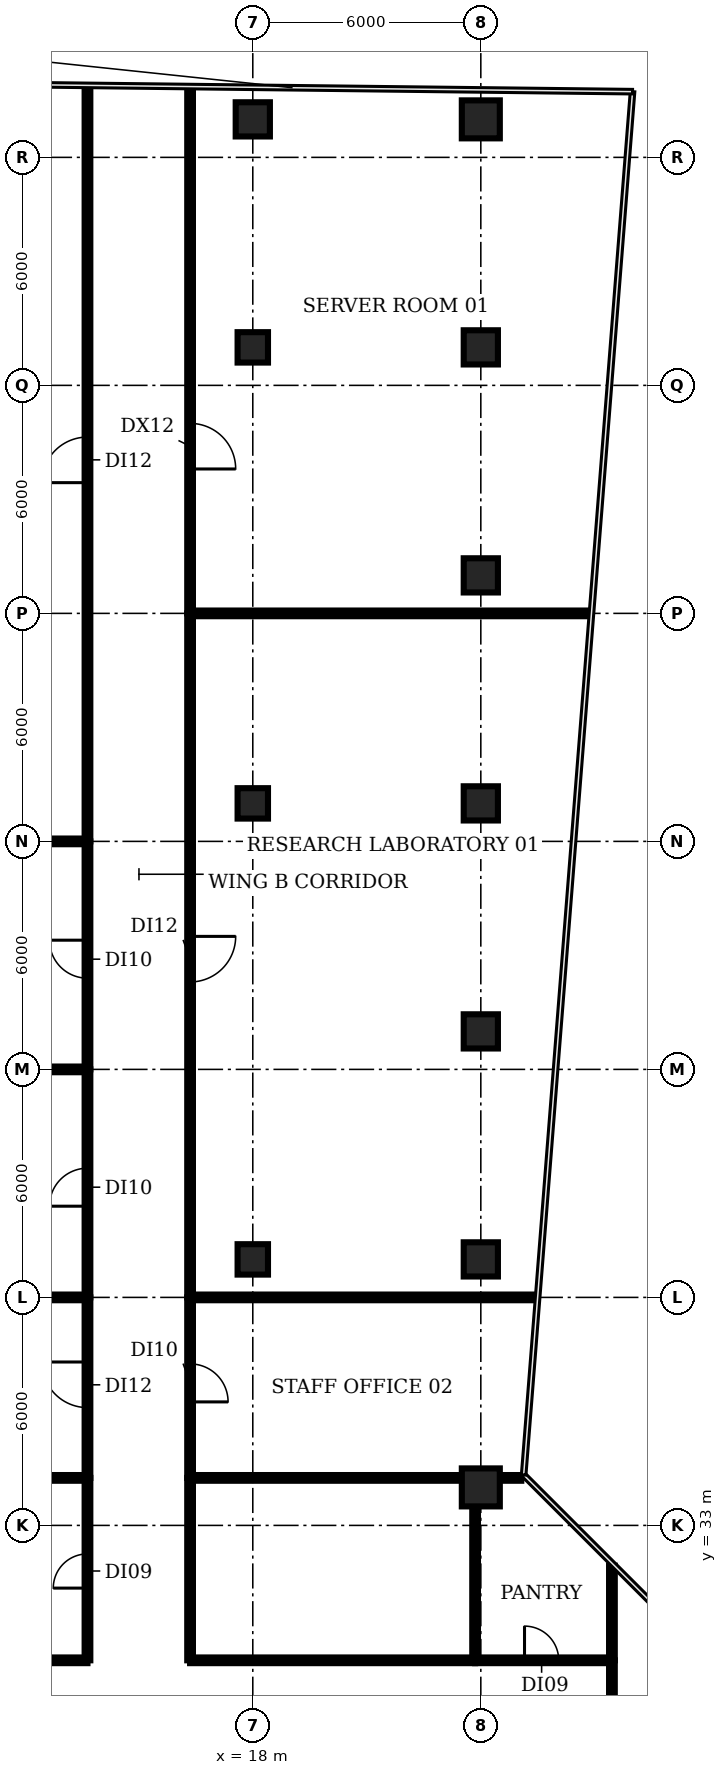
"""IFC4 building model, lengths in metres.
Left out: names, types, materials, properties, quantities, classifications, styles, units other than length and angle.
Written with IfcOpenShell. Run it as: python <this file> out.ifc"""

import sys

from ifc_helpers import new_model, si_unit, direction, frame, frame_2d, origin, origin_2d, place, context, subcontext, project, spatial, rectangle, circle, extrude, element, fill, save


model = new_model("IFC4")
c1 = context("Model", 3, precision=1e-05, world=origin(), true_north=direction((0.0, 1.0)))
c2 = subcontext(c1, "Body", "Model", "MODEL_VIEW")
j1 = project(units=[si_unit("LENGTHUNIT", "METRE"), si_unit("PLANEANGLEUNIT", "RADIAN")], contexts=[c1])
p1 = place(None, origin())
s1 = spatial("IfcSite", under=j1, at=p1, CompositionType="ELEMENT")
p2 = place(p1, origin())
s2 = spatial("IfcBuilding", under=s1, at=p2, CompositionType="ELEMENT")
p3 = place(p2, frame((0.0, 0.0, 129.8)))
s3 = spatial("IfcBuildingStorey", under=s2, at=p3, CompositionType="ELEMENT", Elevation=129.8)
for number, where, z_axis, x_axis in (
    (1, (18.0, 40.0, 0.0), (0.0, 0.0, 1.0), (1.0, 0.0, 0.0)),
    (2, (18.0, 52.0, 0.0), (0.0, 0.0, 1.0), (1.0, 0.0, 0.0)),
    (3, (18.0, 64.0, 0.0), (0.0, 0.0, 1.0), (1.0, 0.0, 0.0)),
):
    element("IfcColumn", number, at=place(p3, frame(where, z_axis=z_axis, x_axis=x_axis)), inside=s3, PredefinedType="COLUMN", context=c2, shape_type="SweptSolid", body=[
        extrude(rectangle(XDim=0.8, YDim=0.8, at=origin_2d()), origin(), (0.0, 0.0, 1.0), 3.85),
    ])
p4 = place(p3, frame((18.0, 70.0, 0.0), z_axis=(0.0, 0.0, 1.0), x_axis=(1.0, 0.0, 0.0)))
e4 = element("IfcColumn", 4, at=p4, inside=s3, PredefinedType="COLUMN", context=c2, shape_type="SweptSolid", body=[
    extrude(rectangle(XDim=0.9, YDim=0.9, at=origin_2d()), origin(), (0.0, 0.0, 1.0), 3.85),
])
p5 = place(p3, frame((24.0, 34.0, 0.0), z_axis=(0.0, 0.0, 1.0), x_axis=(1.0, 0.0, 0.0)))
e5 = element("IfcColumn", 5, at=p5, inside=s3, PredefinedType="COLUMN", context=c2, shape_type="SweptSolid", body=[
    extrude(circle(Radius=0.5, at=origin_2d()), origin(), (0.0, 0.0, 1.0), 3.85),
])
for number, where, z_axis, x_axis in (
    (6, (24.0, 40.0, 0.0), (0.0, 0.0, 1.0), (1.0, 0.0, 0.0)),
    (7, (24.0, 46.0, 0.0), (0.0, 0.0, 1.0), (1.0, 0.0, 0.0)),
    (8, (24.0, 52.0, 0.0), (0.0, 0.0, 1.0), (1.0, 0.0, 0.0)),
    (9, (24.0, 58.0, 0.0), (0.0, 0.0, 1.0), (1.0, 0.0, 0.0)),
    (10, (24.0, 64.0, 0.0), (0.0, 0.0, 1.0), (1.0, 0.0, 0.0)),
):
    element("IfcColumn", number, at=place(p3, frame(where, z_axis=z_axis, x_axis=x_axis)), inside=s3, PredefinedType="COLUMN", context=c2, shape_type="SweptSolid", body=[
        extrude(rectangle(XDim=0.9, YDim=0.9, at=origin_2d()), origin(), (0.0, 0.0, 1.0), 3.85),
    ])
p6 = place(p3, frame((24.0, 70.0, 0.0), z_axis=(0.0, 0.0, 1.0), x_axis=(1.0, 0.0, 0.0)))
e11 = element("IfcColumn", 11, at=p6, inside=s3, PredefinedType="COLUMN", context=c2, shape_type="SweptSolid", body=[
    extrude(circle(Radius=0.5, at=origin_2d()), origin(), (0.0, 0.0, 1.0), 3.85),
])
p7 = place(p3, frame((-0.965, 34.25, 0.0), z_axis=(0.0, 0.0, 1.0), x_axis=(1.0, 0.0, 0.0)))
e12 = element("IfcWall", 12, at=p7, inside=s3, PredefinedType="PARTITIONING", context=c2, shape_type="SweptSolid", body=[
    extrude(rectangle(XDim=14.615, YDim=0.15, at=frame_2d((7.308, 0.0))), origin(), (0.0, 0.0, 1.0), 2.83),
])
for number, where, z_axis, x_axis in (
    (13, (-0.98, 39.0, 0.0), (0.0, 0.0, 1.0), (1.0, 0.0, 0.0)),
    (14, (-0.98, 45.0, 0.0), (0.0, 0.0, 1.0), (1.0, 0.0, 0.0)),
    (15, (-0.98, 51.0, 0.0), (0.0, 0.0, 1.0), (1.0, 0.0, 0.0)),
):
    element("IfcWall", number, at=place(p3, frame(where, z_axis=z_axis, x_axis=x_axis)), inside=s3, PredefinedType="PARTITIONING", context=c2, shape_type="SweptSolid", body=[
        extrude(rectangle(XDim=14.63, YDim=0.15, at=frame_2d((7.315, 0.0))), origin(), (0.0, 0.0, 1.0), 2.83),
    ])
p8 = place(p3, frame((8.8, 29.45, 0.0), z_axis=(0.0, 0.0, 1.0), x_axis=(1.0, 0.0, 0.0)))
e16 = element("IfcWall", 16, at=p8, inside=s3, PredefinedType="PARTITIONING", context=c2, shape_type="SweptSolid", body=[
    extrude(rectangle(XDim=4.85, YDim=0.15, at=frame_2d((2.425, 0.0))), origin(), (0.0, 0.0, 1.0), 2.83),
])
p9 = place(p3, frame((13.65, 29.45, 0.0), z_axis=(0.0, 0.0, 1.0), x_axis=(0.0, 1.0, 0.0)))
e17 = element("IfcWall", 17, at=p9, inside=s3, PredefinedType="PARTITIONING", context=c2, shape_type="SweptSolid", body=[
    extrude(rectangle(XDim=4.8, YDim=0.15, at=frame_2d((2.4, 0.0))), origin(), (0.0, 0.0, 1.0), 2.83),
])
p10 = place(p9, frame((1.9, 0.0, 0.0)))
e18 = element("IfcOpeningElement", 18, at=p10, cuts=e17, PredefinedType="OPENING", context=c2, shape_type="SweptSolid", body=[
    extrude(rectangle(XDim=0.9, YDim=2.1, at=frame_2d((0.45, 1.05))), frame((0.0, 0.085, 0.0), z_axis=(0.0, -1.0, 0.0), x_axis=(1.0, 0.0, 0.0)), (0.0, 0.0, 1.0), 0.17),
])
p11 = place(p3, frame((13.65, 34.25, 0.0), z_axis=(0.0, 0.0, 1.0), x_axis=(0.0, 1.0, 0.0)))
e19 = element("IfcWall", 19, at=p11, inside=s3, PredefinedType="PARTITIONING", context=c2, shape_type="SweptSolid", body=[
    extrude(rectangle(XDim=4.75, YDim=0.15, at=frame_2d((2.375, 0.0))), origin(), (0.0, 0.0, 1.0), 2.83),
])
p12 = place(p11, frame((1.85, 0.0, 0.0)))
e20 = element("IfcOpeningElement", 20, at=p12, cuts=e19, PredefinedType="OPENING", context=c2, shape_type="SweptSolid", body=[
    extrude(rectangle(XDim=1.2, YDim=2.1, at=frame_2d((0.6, 1.05))), frame((0.0, 0.085, 0.0), z_axis=(0.0, -1.0, 0.0), x_axis=(1.0, 0.0, 0.0)), (0.0, 0.0, 1.0), 0.17),
])
p13 = place(p3, frame((13.65, 39.0, 0.0), z_axis=(0.0, 0.0, 1.0), x_axis=(0.0, 1.0, 0.0)))
e21 = element("IfcWall", 21, at=p13, inside=s3, PredefinedType="PARTITIONING", context=c2, shape_type="SweptSolid", body=[
    extrude(rectangle(XDim=6.0, YDim=0.15, at=frame_2d((3.0, 0.0))), origin(), (0.0, 0.0, 1.0), 2.83),
])
p14 = place(p13, frame((2.4, 0.0, 0.0)))
e22 = element("IfcOpeningElement", 22, at=p14, cuts=e21, PredefinedType="OPENING", context=c2, shape_type="SweptSolid", body=[
    extrude(rectangle(XDim=1.0, YDim=2.1, at=frame_2d((0.5, 1.05))), frame((0.0, 0.085, 0.0), z_axis=(0.0, -1.0, 0.0), x_axis=(1.0, 0.0, 0.0)), (0.0, 0.0, 1.0), 0.17),
])
p15 = place(p3, frame((13.65, 45.0, 0.0), z_axis=(0.0, 0.0, 1.0), x_axis=(0.0, 1.0, 0.0)))
e23 = element("IfcWall", 23, at=p15, inside=s3, PredefinedType="PARTITIONING", context=c2, shape_type="SweptSolid", body=[
    extrude(rectangle(XDim=6.0, YDim=0.15, at=frame_2d((3.0, 0.0))), origin(), (0.0, 0.0, 1.0), 2.83),
])
p16 = place(p15, frame((2.4, 0.0, 0.0)))
e24 = element("IfcOpeningElement", 24, at=p16, cuts=e23, PredefinedType="OPENING", context=c2, shape_type="SweptSolid", body=[
    extrude(rectangle(XDim=1.0, YDim=2.1, at=frame_2d((0.5, 1.05))), frame((0.0, 0.085, 0.0), z_axis=(0.0, -1.0, 0.0), x_axis=(1.0, 0.0, 0.0)), (0.0, 0.0, 1.0), 0.17),
])
p17 = place(p3, frame((13.65, 51.0, 0.0), z_axis=(0.0, 0.0, 1.0), x_axis=(0.0, 1.0, 0.0)))
e25 = element("IfcWall", 25, at=p17, inside=s3, PredefinedType="PARTITIONING", context=c2, shape_type="SweptSolid", body=[
    extrude(rectangle(XDim=19.84, YDim=0.15, at=frame_2d((9.92, 0.0))), origin(), (0.0, 0.0, 1.0), 2.83),
])
p18 = place(p17, frame((9.44, 0.0, 0.0)))
e26 = element("IfcOpeningElement", 26, at=p18, cuts=e25, PredefinedType="OPENING", context=c2, shape_type="SweptSolid", body=[
    extrude(rectangle(XDim=1.2, YDim=2.1, at=frame_2d((0.6, 1.05))), frame((0.0, 0.085, 0.0), z_axis=(0.0, -1.0, 0.0), x_axis=(1.0, 0.0, 0.0)), (0.0, 0.0, 1.0), 0.17),
])
p19 = place(p3, frame((16.35, 29.45, 0.0), z_axis=(0.0, 0.0, 1.0), x_axis=(0.0, 1.0, 0.0)))
e27 = element("IfcWall", 27, at=p19, inside=s3, PredefinedType="PARTITIONING", context=c2, shape_type="SweptSolid", body=[
    extrude(rectangle(XDim=4.8, YDim=0.15, at=frame_2d((2.4, 0.0))), origin(), (0.0, 0.0, 1.0), 2.83),
])
p20 = place(p3, frame((16.35, 29.45, 0.0), z_axis=(0.0, 0.0, 1.0), x_axis=(1.0, 0.0, 0.0)))
e28 = element("IfcWall", 28, at=p20, inside=s3, PredefinedType="PARTITIONING", context=c2, shape_type="SweptSolid", body=[
    extrude(rectangle(XDim=7.5, YDim=0.15, at=frame_2d((3.75, 0.0))), origin(), (0.0, 0.0, 1.0), 2.83),
])
p21 = place(p3, frame((16.35, 34.25, 0.0), z_axis=(0.0, 0.0, 1.0), x_axis=(1.0, 0.0, 0.0)))
e29 = element("IfcWall", 29, at=p21, inside=s3, PredefinedType="PARTITIONING", context=c2, shape_type="SweptSolid", body=[
    extrude(rectangle(XDim=8.715, YDim=0.15, at=frame_2d((4.357, 0.0))), origin(), (0.0, 0.0, 1.0), 2.83),
])
p22 = place(p3, frame((16.35, 39.0, 0.0), z_axis=(0.0, 0.0, 1.0), x_axis=(0.0, -1.0, 0.0)))
e30 = element("IfcWall", 30, at=p22, inside=s3, PredefinedType="PARTITIONING", context=c2, shape_type="SweptSolid", body=[
    extrude(rectangle(XDim=4.75, YDim=0.15, at=frame_2d((2.375, 0.0))), origin(), (0.0, 0.0, 1.0), 2.83),
])
p23 = place(p22, frame((1.75, 0.0, 0.0)))
e31 = element("IfcOpeningElement", 31, at=p23, cuts=e30, PredefinedType="OPENING", context=c2, shape_type="SweptSolid", body=[
    extrude(rectangle(XDim=1.0, YDim=2.1, at=frame_2d((0.5, 1.05))), frame((0.0, 0.085, 0.0), z_axis=(0.0, -1.0, 0.0), x_axis=(1.0, 0.0, 0.0)), (0.0, 0.0, 1.0), 0.17),
])
p24 = place(p3, frame((16.35, 39.0, 0.0), z_axis=(0.0, 0.0, 1.0), x_axis=(1.0, 0.0, 0.0)))
e32 = element("IfcWall", 32, at=p24, inside=s3, PredefinedType="PARTITIONING", context=c2, shape_type="SweptSolid", body=[
    extrude(rectangle(XDim=9.1, YDim=0.15, at=frame_2d((4.55, 0.0))), origin(), (0.0, 0.0, 1.0), 2.83),
])
p25 = place(p3, frame((16.35, 57.0, 0.0), z_axis=(0.0, 0.0, 1.0), x_axis=(0.0, -1.0, 0.0)))
e33 = element("IfcWall", 33, at=p25, inside=s3, PredefinedType="PARTITIONING", context=c2, shape_type="SweptSolid", body=[
    extrude(rectangle(XDim=18.0, YDim=0.15, at=frame_2d((9.0, 0.0))), origin(), (0.0, 0.0, 1.0), 2.83),
])
p26 = place(p25, frame((8.5, 0.0, 0.0)))
e34 = element("IfcOpeningElement", 34, at=p26, cuts=e33, PredefinedType="OPENING", context=c2, shape_type="SweptSolid", body=[
    extrude(rectangle(XDim=1.2, YDim=2.1, at=frame_2d((0.6, 1.05))), frame((0.0, 0.085, 0.0), z_axis=(0.0, -1.0, 0.0), x_axis=(1.0, 0.0, 0.0)), (0.0, 0.0, 1.0), 0.17),
])
p27 = place(p3, frame((16.35, 57.0, 0.0), z_axis=(0.0, 0.0, 1.0), x_axis=(1.0, 0.0, 0.0)))
e35 = element("IfcWall", 35, at=p27, inside=s3, PredefinedType="PARTITIONING", context=c2, shape_type="SweptSolid", body=[
    extrude(rectangle(XDim=10.51, YDim=0.15, at=frame_2d((5.255, 0.0))), origin(), (0.0, 0.0, 1.0), 2.83),
])
p28 = place(p3, frame((16.35, 70.81, 0.0), z_axis=(0.0, 0.0, 1.0), x_axis=(0.0, -1.0, 0.0)))
e36 = element("IfcWall", 36, at=p28, inside=s3, PredefinedType="PARTITIONING", context=c2, shape_type="SweptSolid", body=[
    extrude(rectangle(XDim=13.81, YDim=0.15, at=frame_2d((6.905, 0.0))), origin(), (0.0, 0.0, 1.0), 2.83),
])
p29 = place(p28, frame((8.81, 0.0, 0.0)))
e37 = element("IfcOpeningElement", 37, at=p29, cuts=e36, PredefinedType="OPENING", context=c2, shape_type="SweptSolid", body=[
    extrude(rectangle(XDim=1.2, YDim=2.1, at=frame_2d((0.6, 1.05))), frame((0.0, 0.085, 0.0), z_axis=(0.0, -1.0, 0.0), x_axis=(1.0, 0.0, 0.0)), (0.0, 0.0, 1.0), 0.17),
])
p30 = place(p3, frame((23.85, 29.45, 0.0), z_axis=(0.0, 0.0, 1.0), x_axis=(0.0, 1.0, 0.0)))
e38 = element("IfcWall", 38, at=p30, inside=s3, PredefinedType="PARTITIONING", context=c2, shape_type="SweptSolid", body=[
    extrude(rectangle(XDim=4.8, YDim=0.15, at=frame_2d((2.4, 0.0))), origin(), (0.0, 0.0, 1.0), 2.83),
])
p31 = place(p3, frame((23.85, 29.45, 0.0), z_axis=(0.0, 0.0, 1.0), x_axis=(1.0, 0.0, 0.0)))
e39 = element("IfcWall", 39, at=p31, inside=s3, PredefinedType="PARTITIONING", context=c2, shape_type="SweptSolid", body=[
    extrude(rectangle(XDim=3.6, YDim=0.15, at=frame_2d((1.8, 0.0))), origin(), (0.0, 0.0, 1.0), 2.83),
])
p32 = place(p31, frame((1.3, 0.0, 0.0)))
e40 = element("IfcOpeningElement", 40, at=p32, cuts=e39, PredefinedType="OPENING", context=c2, shape_type="SweptSolid", body=[
    extrude(rectangle(XDim=0.9, YDim=2.1, at=frame_2d((0.45, 1.05))), frame((0.0, 0.085, 0.0), z_axis=(0.0, -1.0, 0.0), x_axis=(1.0, 0.0, 0.0)), (0.0, 0.0, 1.0), 0.17),
])
p33 = place(p3, frame((27.45, 25.6, 0.0), z_axis=(0.0, 0.0, 1.0), x_axis=(0.0, 1.0, 0.0)))
e41 = element("IfcWall", 41, at=p33, inside=s3, PredefinedType="PARTITIONING", context=c2, shape_type="SweptSolid", body=[
    extrude(rectangle(XDim=3.85, YDim=0.15, at=frame_2d((1.925, 0.0))), origin(), (0.0, 0.0, 1.0), 2.83),
])
p34 = place(p3, frame((27.45, 29.45, 0.0), z_axis=(0.0, 0.0, 1.0), x_axis=(0.0, 1.0, 0.0)))
e42 = element("IfcWall", 42, at=p34, inside=s3, PredefinedType="PARTITIONING", context=c2, shape_type="SweptSolid", body=[
    extrude(rectangle(XDim=2.49, YDim=0.15, at=frame_2d((1.245, 0.0))), origin(), (0.0, 0.0, 1.0), 2.83),
])
p35 = place(p10, origin())
e43 = element("IfcDoor", 43, at=p35, inside=s3, OperationType="SINGLE_SWING_LEFT", PredefinedType="DOOR", context=c2, shape_type="SweptSolid", body=[
    extrude(rectangle(XDim=0.9, YDim=2.1, at=frame_2d((0.45, 1.05))), frame((0.0, 0.025, 0.0), z_axis=(0.0, -1.0, 0.0), x_axis=(1.0, 0.0, 0.0)), (0.0, 0.0, 1.0), 0.05),
])
fill(e18, e43)
p36 = place(p12, origin())
e44 = element("IfcDoor", 44, at=p36, inside=s3, OperationType="SINGLE_SWING_RIGHT", PredefinedType="DOOR", context=c2, shape_type="SweptSolid", body=[
    extrude(rectangle(XDim=1.2, YDim=2.1, at=frame_2d((0.6, 1.05))), frame((0.0, 0.025, 0.0), z_axis=(0.0, -1.0, 0.0), x_axis=(1.0, 0.0, 0.0)), (0.0, 0.0, 1.0), 0.05),
])
fill(e20, e44)
p37 = place(p14, origin())
e45 = element("IfcDoor", 45, at=p37, inside=s3, OperationType="SINGLE_SWING_LEFT", PredefinedType="DOOR", context=c2, shape_type="SweptSolid", body=[
    extrude(rectangle(XDim=1.0, YDim=2.1, at=frame_2d((0.5, 1.05))), frame((0.0, 0.025, 0.0), z_axis=(0.0, -1.0, 0.0), x_axis=(1.0, 0.0, 0.0)), (0.0, 0.0, 1.0), 0.05),
])
fill(e22, e45)
p38 = place(p16, origin())
e46 = element("IfcDoor", 46, at=p38, inside=s3, OperationType="SINGLE_SWING_RIGHT", PredefinedType="DOOR", context=c2, shape_type="SweptSolid", body=[
    extrude(rectangle(XDim=1.0, YDim=2.1, at=frame_2d((0.5, 1.05))), frame((0.0, 0.025, 0.0), z_axis=(0.0, -1.0, 0.0), x_axis=(1.0, 0.0, 0.0)), (0.0, 0.0, 1.0), 0.05),
])
fill(e24, e46)
p39 = place(p18, origin())
e47 = element("IfcDoor", 47, at=p39, inside=s3, OperationType="SINGLE_SWING_LEFT", PredefinedType="DOOR", context=c2, shape_type="SweptSolid", body=[
    extrude(rectangle(XDim=1.2, YDim=2.1, at=frame_2d((0.6, 1.05))), frame((0.0, 0.025, 0.0), z_axis=(0.0, -1.0, 0.0), x_axis=(1.0, 0.0, 0.0)), (0.0, 0.0, 1.0), 0.05),
])
fill(e26, e47)
p40 = place(p23, origin())
e48 = element("IfcDoor", 48, at=p40, inside=s3, OperationType="SINGLE_SWING_RIGHT", PredefinedType="DOOR", context=c2, shape_type="SweptSolid", body=[
    extrude(rectangle(XDim=1.0, YDim=2.1, at=frame_2d((0.5, 1.05))), frame((0.0, 0.025, 0.0), z_axis=(0.0, -1.0, 0.0), x_axis=(1.0, 0.0, 0.0)), (0.0, 0.0, 1.0), 0.05),
])
fill(e31, e48)
p41 = place(p26, origin())
e49 = element("IfcDoor", 49, at=p41, inside=s3, OperationType="SINGLE_SWING_LEFT", PredefinedType="DOOR", context=c2, shape_type="SweptSolid", body=[
    extrude(rectangle(XDim=1.2, YDim=2.1, at=frame_2d((0.6, 1.05))), frame((0.0, 0.025, 0.0), z_axis=(0.0, -1.0, 0.0), x_axis=(1.0, 0.0, 0.0)), (0.0, 0.0, 1.0), 0.05),
])
fill(e34, e49)
p42 = place(p29, origin())
e50 = element("IfcDoor", 50, at=p42, inside=s3, OperationType="SINGLE_SWING_RIGHT", PredefinedType="DOOR", context=c2, shape_type="SweptSolid", body=[
    extrude(rectangle(XDim=1.2, YDim=2.1, at=frame_2d((0.6, 1.05))), frame((0.0, 0.025, 0.0), z_axis=(0.0, -1.0, 0.0), x_axis=(1.0, 0.0, 0.0)), (0.0, 0.0, 1.0), 0.05),
])
fill(e37, e50)
p43 = place(p32, origin())
e51 = element("IfcDoor", 51, at=p43, inside=s3, OperationType="SINGLE_SWING_LEFT", PredefinedType="DOOR", context=c2, shape_type="SweptSolid", body=[
    extrude(rectangle(XDim=0.9, YDim=2.1, at=frame_2d((0.45, 1.05))), frame((0.0, 0.025, 0.0), z_axis=(0.0, -1.0, 0.0), x_axis=(1.0, 0.0, 0.0)), (0.0, 0.0, 1.0), 0.05),
])
fill(e40, e51)
save(model, sys.argv[1])
